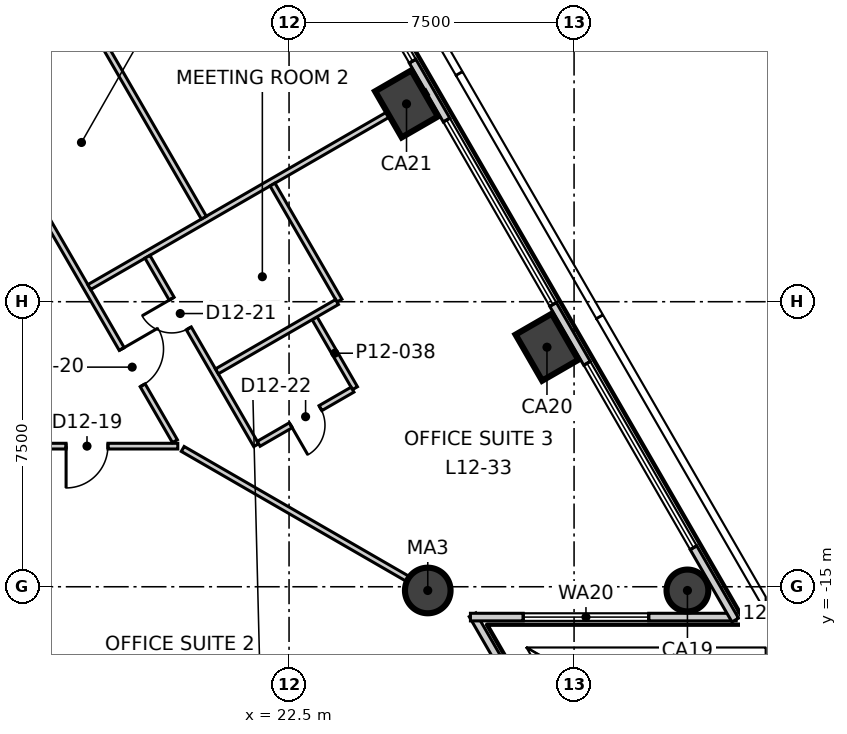
"""IFC4 building model, lengths in metres.
Left out: names, types, materials, properties, quantities, classifications, styles, units other than length and angle.
Written with IfcOpenShell. Run it as: python <this file> out.ifc"""

import sys

from ifc_helpers import new_model, si_unit, direction, frame, frame_2d, origin, origin_2d, place, context, subcontext, project, spatial, rectangle, circle, extrude, element, fill, save


model = new_model("IFC4")
c1 = context("Model", 3, precision=1e-05, world=origin(), true_north=direction((0.0, 1.0)))
c2 = subcontext(c1, "Body", "Model", "MODEL_VIEW")
j1 = project(units=[si_unit("LENGTHUNIT", "METRE"), si_unit("PLANEANGLEUNIT", "RADIAN")], contexts=[c1])
p1 = place(None, origin())
s1 = spatial("IfcSite", under=j1, at=p1, CompositionType="ELEMENT")
p2 = place(p1, origin())
s2 = spatial("IfcBuilding", under=s1, at=p2, CompositionType="ELEMENT")
p3 = place(p2, frame((0.0, 0.0, 59.3)))
s3 = spatial("IfcBuildingStorey", under=s2, at=p3, CompositionType="ELEMENT", Elevation=59.3)
p4 = place(p3, frame((32.983, -15.098, -0.3), z_axis=(0.0, 0.0, 1.0), x_axis=(-0.5, 0.866025403784, 0.0)))
e1 = element("IfcColumn", 1, at=p4, inside=s3, PredefinedType="COLUMN", context=c2, shape_type="SweptSolid", body=[
    extrude(circle(Radius=0.55, at=origin_2d()), origin(), (0.0, 0.0, 1.0), 4.0),
])
for number, where, z_axis, x_axis in (
    (2, (29.287, -8.697, -0.3), (0.0, 0.0, 1.0), (-0.5, 0.866, 0.0)),
    (3, (25.591, -2.295, -0.3), (0.0, 0.0, 1.0), (-0.5, 0.866, 0.0)),
):
    element("IfcColumn", number, at=place(p3, frame(where, z_axis=z_axis, x_axis=x_axis)), inside=s3, PredefinedType="COLUMN", context=c2, shape_type="SweptSolid", body=[
        extrude(rectangle(XDim=1.4, YDim=1.1, at=origin_2d()), origin(), (0.0, 0.0, 1.0), 4.0),
    ])
p5 = place(p3, frame((26.15, -15.098, -0.3), z_axis=(0.0, 0.0, 1.0), x_axis=(1.0, 0.0, 0.0)))
e4 = element("IfcColumn", 4, at=p5, inside=s3, PredefinedType="COLUMN", context=c2, shape_type="SweptSolid", body=[
    extrude(circle(Radius=0.6, at=origin_2d()), origin(), (0.0, 0.0, 1.0), 4.0),
])
p6 = place(p3, frame((30.824, -21.793, 0.0), z_axis=(0.0, 0.0, 1.0), x_axis=(-0.499969272857, 0.866043143382, 0.0)))
e5 = element("IfcWall", 5, at=p6, inside=s3, PredefinedType="ELEMENTEDWALL", context=c2, shape_type="SweptSolid", body=[
    extrude(rectangle(XDim=6.993, YDim=0.2, at=frame_2d((3.496, 0.0))), origin(), (0.0, 0.0, 1.0), 3.7),
])
p7 = place(p6, frame((1.99, 0.0, 0.9)))
e6 = element("IfcOpeningElement", 6, at=p7, cuts=e5, PredefinedType="OPENING", context=c2, shape_type="SweptSolid", body=[
    extrude(rectangle(XDim=3.3, YDim=2.5, at=frame_2d((1.65, 1.25))), frame((0.0, 0.11, 0.0), z_axis=(0.0, -1.0, 0.0), x_axis=(1.0, 0.0, 0.0)), (0.0, 0.0, 1.0), 0.22),
])
p8 = place(p3, frame((27.273, -15.798, 0.0), z_axis=(0.0, 0.0, 1.0), x_axis=(1.0, 0.0, 0.0)))
e7 = element("IfcWall", 7, at=p8, inside=s3, PredefinedType="ELEMENTEDWALL", context=c2, shape_type="SweptSolid", body=[
    extrude(rectangle(XDim=6.993, YDim=0.2, at=frame_2d((3.497, 0.0))), origin(), (0.0, 0.0, 1.0), 3.7),
])
p9 = place(p8, frame((1.39, 0.0, 0.9)))
e8 = element("IfcOpeningElement", 8, at=p9, cuts=e7, PredefinedType="OPENING", context=c2, shape_type="SweptSolid", body=[
    extrude(rectangle(XDim=3.3, YDim=2.5, at=frame_2d((1.65, 1.25))), frame((0.0, 0.11, 0.0), z_axis=(0.0, -1.0, 0.0), x_axis=(1.0, 0.0, 0.0)), (0.0, 0.0, 1.0), 0.22),
])
p10 = place(p3, frame((34.241, -15.876, 0.0), z_axis=(0.0, 0.0, 1.0), x_axis=(-0.500006313899, 0.866021758423, 0.0)))
e9 = element("IfcWall", 9, at=p10, inside=s3, PredefinedType="ELEMENTEDWALL", context=c2, shape_type="SweptSolid", body=[
    extrude(rectangle(XDim=61.719, YDim=0.2, at=frame_2d((30.859, 0.0))), origin(), (0.0, 0.0, 1.0), 3.7),
])
p11 = place(p10, frame((2.199, 0.0, 0.9)))
e10 = element("IfcOpeningElement", 10, at=p11, cuts=e9, PredefinedType="OPENING", context=c2, shape_type="SweptSolid", body=[
    extrude(rectangle(XDim=5.6, YDim=2.5, at=frame_2d((2.8, 1.25))), frame((0.0, 0.11, 0.0), z_axis=(0.0, -1.0, 0.0), x_axis=(1.0, 0.0, 0.0)), (0.0, 0.0, 1.0), 0.22),
])
p12 = place(p10, frame((9.59, 0.0, 0.9)))
e11 = element("IfcOpeningElement", 11, at=p12, cuts=e9, PredefinedType="OPENING", context=c2, shape_type="SweptSolid", body=[
    extrude(rectangle(XDim=5.6, YDim=2.5, at=frame_2d((2.8, 1.25))), frame((0.0, 0.11, 0.0), z_axis=(0.0, -1.0, 0.0), x_axis=(1.0, 0.0, 0.0)), (0.0, 0.0, 1.0), 0.22),
])
p13 = place(p10, frame((16.982, 0.0, 0.9)))
e12 = element("IfcOpeningElement", 12, at=p13, cuts=e9, PredefinedType="OPENING", context=c2, shape_type="SweptSolid", body=[
    extrude(rectangle(XDim=5.6, YDim=2.5, at=frame_2d((2.8, 1.25))), frame((0.0, 0.11, 0.0), z_axis=(0.0, -1.0, 0.0), x_axis=(1.0, 0.0, 0.0)), (0.0, 0.0, 1.0), 0.22),
])
p14 = place(p10, frame((24.374, 0.0, 0.9)))
e13 = element("IfcOpeningElement", 13, at=p14, cuts=e9, PredefinedType="OPENING", context=c2, shape_type="SweptSolid", body=[
    extrude(rectangle(XDim=5.6, YDim=2.5, at=frame_2d((2.8, 1.25))), frame((0.0, 0.11, 0.0), z_axis=(0.0, -1.0, 0.0), x_axis=(1.0, 0.0, 0.0)), (0.0, 0.0, 1.0), 0.22),
])
p15 = place(p10, frame((31.765, 0.0, 0.9)))
e14 = element("IfcOpeningElement", 14, at=p15, cuts=e9, PredefinedType="OPENING", context=c2, shape_type="SweptSolid", body=[
    extrude(rectangle(XDim=5.6, YDim=2.5, at=frame_2d((2.8, 1.25))), frame((0.0, 0.11, 0.0), z_axis=(0.0, -1.0, 0.0), x_axis=(1.0, 0.0, 0.0)), (0.0, 0.0, 1.0), 0.22),
])
p16 = place(p10, frame((39.157, 0.0, 0.9)))
e15 = element("IfcOpeningElement", 15, at=p16, cuts=e9, PredefinedType="OPENING", context=c2, shape_type="SweptSolid", body=[
    extrude(rectangle(XDim=5.6, YDim=2.5, at=frame_2d((2.8, 1.25))), frame((0.0, 0.11, 0.0), z_axis=(0.0, -1.0, 0.0), x_axis=(1.0, 0.0, 0.0)), (0.0, 0.0, 1.0), 0.22),
])
p17 = place(p10, frame((46.549, 0.0, 0.9)))
e16 = element("IfcOpeningElement", 16, at=p17, cuts=e9, PredefinedType="OPENING", context=c2, shape_type="SweptSolid", body=[
    extrude(rectangle(XDim=5.6, YDim=2.5, at=frame_2d((2.8, 1.25))), frame((0.0, 0.11, 0.0), z_axis=(0.0, -1.0, 0.0), x_axis=(1.0, 0.0, 0.0)), (0.0, 0.0, 1.0), 0.22),
])
p18 = place(p10, frame((53.94, 0.0, 0.9)))
e17 = element("IfcOpeningElement", 17, at=p18, cuts=e9, PredefinedType="OPENING", context=c2, shape_type="SweptSolid", body=[
    extrude(rectangle(XDim=5.6, YDim=2.5, at=frame_2d((2.8, 1.25))), frame((0.0, 0.11, 0.0), z_axis=(0.0, -1.0, 0.0), x_axis=(1.0, 0.0, 0.0)), (0.0, 0.0, 1.0), 0.22),
])
p19 = place(p3, frame((-19.422, -11.3, 0.0), z_axis=(0.0, 0.0, 1.0), x_axis=(1.0, 0.0, 0.0)))
e18 = element("IfcWall", 18, at=p19, inside=s3, PredefinedType="PARTITIONING", context=c2, shape_type="SweptSolid", body=[
    extrude(rectangle(XDim=38.994, YDim=0.15, at=frame_2d((19.497, 0.0))), origin(), (0.0, 0.0, 1.0), 3.7),
])
p20 = place(p19, frame((1.7, 0.0, 0.0)))
e19 = element("IfcOpeningElement", 19, at=p20, cuts=e18, PredefinedType="OPENING", context=c2, shape_type="SweptSolid", body=[
    extrude(rectangle(XDim=1.1, YDim=2.1, at=frame_2d((0.55, 1.05))), frame((0.0, 0.085, 0.0), z_axis=(0.0, -1.0, 0.0), x_axis=(1.0, 0.0, 0.0)), (0.0, 0.0, 1.0), 0.17),
])
p21 = place(p19, frame((12.889, 0.0, 0.0)))
e20 = element("IfcOpeningElement", 20, at=p21, cuts=e18, PredefinedType="OPENING", context=c2, shape_type="SweptSolid", body=[
    extrude(rectangle(XDim=1.0, YDim=2.1, at=frame_2d((0.5, 1.05))), frame((0.0, 0.085, 0.0), z_axis=(0.0, -1.0, 0.0), x_axis=(1.0, 0.0, 0.0)), (0.0, 0.0, 1.0), 0.17),
])
p22 = place(p19, frame((5.589, 0.0, 0.0)))
e21 = element("IfcOpeningElement", 21, at=p22, cuts=e18, PredefinedType="OPENING", context=c2, shape_type="SweptSolid", body=[
    extrude(rectangle(XDim=0.9, YDim=2.1, at=frame_2d((0.45, 1.05))), frame((0.0, 0.085, 0.0), z_axis=(0.0, -1.0, 0.0), x_axis=(1.0, 0.0, 0.0)), (0.0, 0.0, 1.0), 0.17),
])
p23 = place(p19, frame((29.272, 0.0, 0.0)))
e22 = element("IfcOpeningElement", 22, at=p23, cuts=e18, PredefinedType="OPENING", context=c2, shape_type="SweptSolid", body=[
    extrude(rectangle(XDim=1.1, YDim=2.1, at=frame_2d((0.55, 1.05))), frame((0.0, 0.085, 0.0), z_axis=(0.0, -1.0, 0.0), x_axis=(1.0, 0.0, 0.0)), (0.0, 0.0, 1.0), 0.17),
])
p24 = place(p19, frame((20.772, 0.0, 0.0)))
e23 = element("IfcOpeningElement", 23, at=p24, cuts=e18, PredefinedType="OPENING", context=c2, shape_type="SweptSolid", body=[
    extrude(rectangle(XDim=0.9, YDim=2.1, at=frame_2d((0.45, 1.05))), frame((0.0, 0.085, 0.0), z_axis=(0.0, -1.0, 0.0), x_axis=(1.0, 0.0, 0.0)), (0.0, 0.0, 1.0), 0.17),
])
p25 = place(p19, frame((23.772, 0.0, 0.0)))
e24 = element("IfcOpeningElement", 24, at=p25, cuts=e18, PredefinedType="OPENING", context=c2, shape_type="SweptSolid", body=[
    extrude(rectangle(XDim=0.9, YDim=2.1, at=frame_2d((0.45, 1.05))), frame((0.0, 0.085, 0.0), z_axis=(0.0, -1.0, 0.0), x_axis=(1.0, 0.0, 0.0)), (0.0, 0.0, 1.0), 0.17),
])
p26 = place(p19, frame((36.055, 0.0, 0.0)))
e25 = element("IfcOpeningElement", 25, at=p26, cuts=e18, PredefinedType="OPENING", context=c2, shape_type="SweptSolid", body=[
    extrude(rectangle(XDim=1.1, YDim=2.1, at=frame_2d((0.55, 1.05))), frame((0.0, 0.085, 0.0), z_axis=(0.0, -1.0, 0.0), x_axis=(1.0, 0.0, 0.0)), (0.0, 0.0, 1.0), 0.17),
])
p27 = place(p3, frame((19.702, -11.374, 0.0), z_axis=(0.0, 0.0, 1.0), x_axis=(0.866050014035, -0.499957371373, 0.0)))
e26 = element("IfcWall", 26, at=p27, inside=s3, PredefinedType="PARTITIONING", context=c2, shape_type="SweptSolid", body=[
    extrude(rectangle(XDim=8.067, YDim=0.15, at=frame_2d((4.033, 0.0))), origin(), (0.0, 0.0, 1.0), 3.1),
])
p28 = place(p3, frame((0.075, 22.47, 0.0), z_axis=(0.0, 0.0, 1.0), x_axis=(0.500002280369, -0.866024087209, 0.0)))
e27 = element("IfcWall", 27, at=p28, inside=s3, PredefinedType="PARTITIONING", context=c2, shape_type="SweptSolid", body=[
    extrude(rectangle(XDim=38.844, YDim=0.15, at=frame_2d((19.422, 0.0))), origin(), (0.0, 0.0, 1.0), 3.7),
])
p29 = place(p28, frame((36.044, 0.0, 0.0)))
e28 = element("IfcOpeningElement", 28, at=p29, cuts=e27, PredefinedType="OPENING", context=c2, shape_type="SweptSolid", body=[
    extrude(rectangle(XDim=1.1, YDim=2.1, at=frame_2d((0.55, 1.05))), frame((0.0, 0.085, 0.0), z_axis=(0.0, -1.0, 0.0), x_axis=(1.0, 0.0, 0.0)), (0.0, 0.0, 1.0), 0.17),
])
p30 = place(p28, frame((26.255, 0.0, 0.0)))
e29 = element("IfcOpeningElement", 29, at=p30, cuts=e27, PredefinedType="OPENING", context=c2, shape_type="SweptSolid", body=[
    extrude(rectangle(XDim=1.1, YDim=2.1, at=frame_2d((0.55, 1.05))), frame((0.0, 0.085, 0.0), z_axis=(0.0, -1.0, 0.0), x_axis=(1.0, 0.0, 0.0)), (0.0, 0.0, 1.0), 0.17),
])
p31 = place(p28, frame((9.173, 0.0, 0.0)))
e30 = element("IfcOpeningElement", 30, at=p31, cuts=e27, PredefinedType="OPENING", context=c2, shape_type="SweptSolid", body=[
    extrude(rectangle(XDim=1.1, YDim=2.1, at=frame_2d((0.55, 1.05))), frame((0.0, 0.085, 0.0), z_axis=(0.0, -1.0, 0.0), x_axis=(1.0, 0.0, 0.0)), (0.0, 0.0, 1.0), 0.17),
])
p32 = place(p28, frame((17.373, 0.0, 0.0)))
e31 = element("IfcOpeningElement", 31, at=p32, cuts=e27, PredefinedType="OPENING", context=c2, shape_type="SweptSolid", body=[
    extrude(rectangle(XDim=0.9, YDim=2.1, at=frame_2d((0.45, 1.05))), frame((0.0, 0.085, 0.0), z_axis=(0.0, -1.0, 0.0), x_axis=(1.0, 0.0, 0.0)), (0.0, 0.0, 1.0), 0.17),
])
p33 = place(p28, frame((14.173, 0.0, 0.0)))
e32 = element("IfcOpeningElement", 32, at=p33, cuts=e27, PredefinedType="OPENING", context=c2, shape_type="SweptSolid", body=[
    extrude(rectangle(XDim=0.9, YDim=2.1, at=frame_2d((0.45, 1.05))), frame((0.0, 0.085, 0.0), z_axis=(0.0, -1.0, 0.0), x_axis=(1.0, 0.0, 0.0)), (0.0, 0.0, 1.0), 0.17),
])
p34 = place(p28, frame((11.273, 0.0, 0.0)))
e33 = element("IfcOpeningElement", 33, at=p34, cuts=e27, PredefinedType="OPENING", context=c2, shape_type="SweptSolid", body=[
    extrude(rectangle(XDim=1.0, YDim=2.1, at=frame_2d((0.5, 1.05))), frame((0.0, 0.085, 0.0), z_axis=(0.0, -1.0, 0.0), x_axis=(1.0, 0.0, 0.0)), (0.0, 0.0, 1.0), 0.17),
])
p35 = place(p28, frame((1.689, 0.0, 0.0)))
e34 = element("IfcOpeningElement", 34, at=p35, cuts=e27, PredefinedType="OPENING", context=c2, shape_type="SweptSolid", body=[
    extrude(rectangle(XDim=1.1, YDim=2.1, at=frame_2d((0.55, 1.05))), frame((0.0, 0.085, 0.0), z_axis=(0.0, -1.0, 0.0), x_axis=(1.0, 0.0, 0.0)), (0.0, 0.0, 1.0), 0.17),
])
p36 = place(p3, frame((17.243, -7.115, 0.0), z_axis=(0.0, 0.0, 1.0), x_axis=(0.866020337685, 0.500008774639, 0.0)))
e35 = element("IfcWall", 35, at=p36, inside=s3, PredefinedType="PARTITIONING", context=c2, shape_type="SweptSolid", body=[
    extrude(rectangle(XDim=10.26, YDim=0.15, at=frame_2d((5.13, 0.0))), origin(), (0.0, 0.0, 1.0), 3.7),
])
p37 = place(p3, frame((23.172, -7.935, 0.0), z_axis=(0.0, 0.0, 1.0), x_axis=(0.500266112279, -0.865871709265, 0.0)))
e36 = element("IfcWall", 36, at=p37, inside=s3, PredefinedType="PARTITIONING", context=c2, shape_type="SweptSolid", body=[
    extrude(rectangle(XDim=2.125, YDim=0.15, at=frame_2d((1.062, 0.0))), origin(), (0.0, 0.0, 1.0), 3.7),
])
p38 = place(p3, frame((18.774, -6.317, 0.0), z_axis=(0.0, 0.0, 1.0), x_axis=(0.499941490393, -0.866059181686, 0.0)))
e37 = element("IfcWall", 37, at=p38, inside=s3, PredefinedType="PARTITIONING", context=c2, shape_type="SweptSolid", body=[
    extrude(rectangle(XDim=5.725, YDim=0.15, at=frame_2d((2.862, 0.0))), origin(), (0.0, 0.0, 1.0), 3.7),
])
p39 = place(p38, frame((1.275, 0.0, 0.0)))
e38 = element("IfcOpeningElement", 38, at=p39, cuts=e37, PredefinedType="OPENING", context=c2, shape_type="SweptSolid", body=[
    extrude(rectangle(XDim=0.9, YDim=2.1, at=frame_2d((0.45, 1.05))), frame((0.0, 0.085, 0.0), z_axis=(0.0, -1.0, 0.0), x_axis=(1.0, 0.0, 0.0)), (0.0, 0.0, 1.0), 0.17),
])
p40 = place(p3, frame((22.065, -4.417, 0.0), z_axis=(0.0, 0.0, 1.0), x_axis=(0.499856357168, -0.86610832013, 0.0)))
e39 = element("IfcWall", 39, at=p40, inside=s3, PredefinedType="PARTITIONING", context=c2, shape_type="SweptSolid", body=[
    extrude(rectangle(XDim=3.525, YDim=0.15, at=frame_2d((1.762, 0.0))), origin(), (0.0, 0.0, 1.0), 3.7),
])
p41 = place(p3, frame((12.942, 7.384, 0.0), z_axis=(0.0, 0.0, 1.0), x_axis=(0.499995423472, -0.866028046028, 0.0)))
e40 = element("IfcWall", 40, at=p41, inside=s3, PredefinedType="PARTITIONING", context=c2, shape_type="SweptSolid", body=[
    extrude(rectangle(XDim=14.633, YDim=0.15, at=frame_2d((7.316, 0.0))), origin(), (0.0, 0.0, 1.0), 3.7),
])
p42 = place(p41, frame((6.857, 0.0, 0.0)))
e41 = element("IfcOpeningElement", 41, at=p42, cuts=e40, PredefinedType="OPENING", context=c2, shape_type="SweptSolid", body=[
    extrude(rectangle(XDim=1.0, YDim=2.1, at=frame_2d((0.5, 1.05))), frame((0.0, 0.085, 0.0), z_axis=(0.0, -1.0, 0.0), x_axis=(1.0, 0.0, 0.0)), (0.0, 0.0, 1.0), 0.17),
])
p43 = place(p3, frame((20.601, -9.333, 0.0), z_axis=(0.0, 0.0, 1.0), x_axis=(0.866024069551, 0.500002310952, 0.0)))
e42 = element("IfcWall", 42, at=p43, inside=s3, PredefinedType="PARTITIONING", context=c2, shape_type="SweptSolid", body=[
    extrude(rectangle(XDim=3.65, YDim=0.15, at=frame_2d((1.825, 0.0))), origin(), (0.0, 0.0, 1.0), 3.7),
])
p44 = place(p3, frame((21.701, -11.238, 0.0), z_axis=(0.0, 0.0, 1.0), x_axis=(0.866090043625, 0.499888023795, 0.0)))
e43 = element("IfcWall", 43, at=p44, inside=s3, PredefinedType="PARTITIONING", context=c2, shape_type="SweptSolid", body=[
    extrude(rectangle(XDim=2.851, YDim=0.15, at=frame_2d((1.425, 0.0))), origin(), (0.0, 0.0, 1.0), 3.7),
])
p45 = place(p44, frame((0.975, 0.0, 0.0)))
e44 = element("IfcOpeningElement", 44, at=p45, cuts=e43, PredefinedType="OPENING", context=c2, shape_type="SweptSolid", body=[
    extrude(rectangle(XDim=0.9, YDim=2.1, at=frame_2d((0.45, 1.05))), frame((0.0, 0.085, 0.0), z_axis=(0.0, -1.0, 0.0), x_axis=(1.0, 0.0, 0.0)), (0.0, 0.0, 1.0), 0.17),
])
p46 = place(p9, origin())
e45 = element("IfcWindow", 45, at=p46, inside=s3, PartitioningType="SINGLE_PANEL", PredefinedType="WINDOW", context=c2, shape_type="SweptSolid", body=[
    extrude(rectangle(XDim=3.3, YDim=2.5, at=frame_2d((1.65, 1.25))), frame((0.0, 0.03, 0.0), z_axis=(0.0, -1.0, 0.0), x_axis=(1.0, 0.0, 0.0)), (0.0, 0.0, 1.0), 0.06),
])
fill(e8, e45)
p47 = place(p11, origin())
e46 = element("IfcWindow", 46, at=p47, inside=s3, PartitioningType="SINGLE_PANEL", PredefinedType="WINDOW", context=c2, shape_type="SweptSolid", body=[
    extrude(rectangle(XDim=5.6, YDim=2.5, at=frame_2d((2.8, 1.25))), frame((0.0, 0.03, 0.0), z_axis=(0.0, -1.0, 0.0), x_axis=(1.0, 0.0, 0.0)), (0.0, 0.0, 1.0), 0.06),
])
fill(e10, e46)
p48 = place(p12, origin())
e47 = element("IfcWindow", 47, at=p48, inside=s3, PartitioningType="SINGLE_PANEL", PredefinedType="WINDOW", context=c2, shape_type="SweptSolid", body=[
    extrude(rectangle(XDim=5.6, YDim=2.5, at=frame_2d((2.8, 1.25))), frame((0.0, 0.03, 0.0), z_axis=(0.0, -1.0, 0.0), x_axis=(1.0, 0.0, 0.0)), (0.0, 0.0, 1.0), 0.06),
])
fill(e11, e47)
p49 = place(p13, origin())
e48 = element("IfcWindow", 48, at=p49, inside=s3, PartitioningType="SINGLE_PANEL", PredefinedType="WINDOW", context=c2, shape_type="SweptSolid", body=[
    extrude(rectangle(XDim=5.6, YDim=2.5, at=frame_2d((2.8, 1.25))), frame((0.0, 0.03, 0.0), z_axis=(0.0, -1.0, 0.0), x_axis=(1.0, 0.0, 0.0)), (0.0, 0.0, 1.0), 0.06),
])
fill(e12, e48)
p50 = place(p26, origin())
e49 = element("IfcDoor", 49, at=p50, inside=s3, OperationType="SINGLE_SWING_LEFT", PredefinedType="DOOR", context=c2, shape_type="SweptSolid", body=[
    extrude(rectangle(XDim=1.1, YDim=2.1, at=frame_2d((0.55, 1.05))), frame((0.0, 0.025, 0.0), z_axis=(0.0, -1.0, 0.0), x_axis=(1.0, 0.0, 0.0)), (0.0, 0.0, 1.0), 0.05),
])
fill(e25, e49)
p51 = place(p29, origin())
e50 = element("IfcDoor", 50, at=p51, inside=s3, OperationType="SINGLE_SWING_RIGHT", PredefinedType="DOOR", context=c2, shape_type="SweptSolid", body=[
    extrude(rectangle(XDim=1.1, YDim=2.1, at=frame_2d((0.55, 1.05))), frame((0.0, 0.025, 0.0), z_axis=(0.0, -1.0, 0.0), x_axis=(1.0, 0.0, 0.0)), (0.0, 0.0, 1.0), 0.05),
])
fill(e28, e50)
p52 = place(p39, origin())
e51 = element("IfcDoor", 51, at=p52, inside=s3, OperationType="SINGLE_SWING_LEFT", PredefinedType="DOOR", context=c2, shape_type="SweptSolid", body=[
    extrude(rectangle(XDim=0.9, YDim=2.1, at=frame_2d((0.45, 1.05))), frame((0.0, 0.025, 0.0), z_axis=(0.0, -1.0, 0.0), x_axis=(1.0, 0.0, 0.0)), (0.0, 0.0, 1.0), 0.05),
])
fill(e38, e51)
p53 = place(p45, origin())
e52 = element("IfcDoor", 52, at=p53, inside=s3, OperationType="SINGLE_SWING_LEFT", PredefinedType="DOOR", context=c2, shape_type="SweptSolid", body=[
    extrude(rectangle(XDim=0.9, YDim=2.1, at=frame_2d((0.45, 1.05))), frame((0.0, 0.025, 0.0), z_axis=(0.0, -1.0, 0.0), x_axis=(1.0, 0.0, 0.0)), (0.0, 0.0, 1.0), 0.05),
])
fill(e44, e52)
save(model, sys.argv[1])
